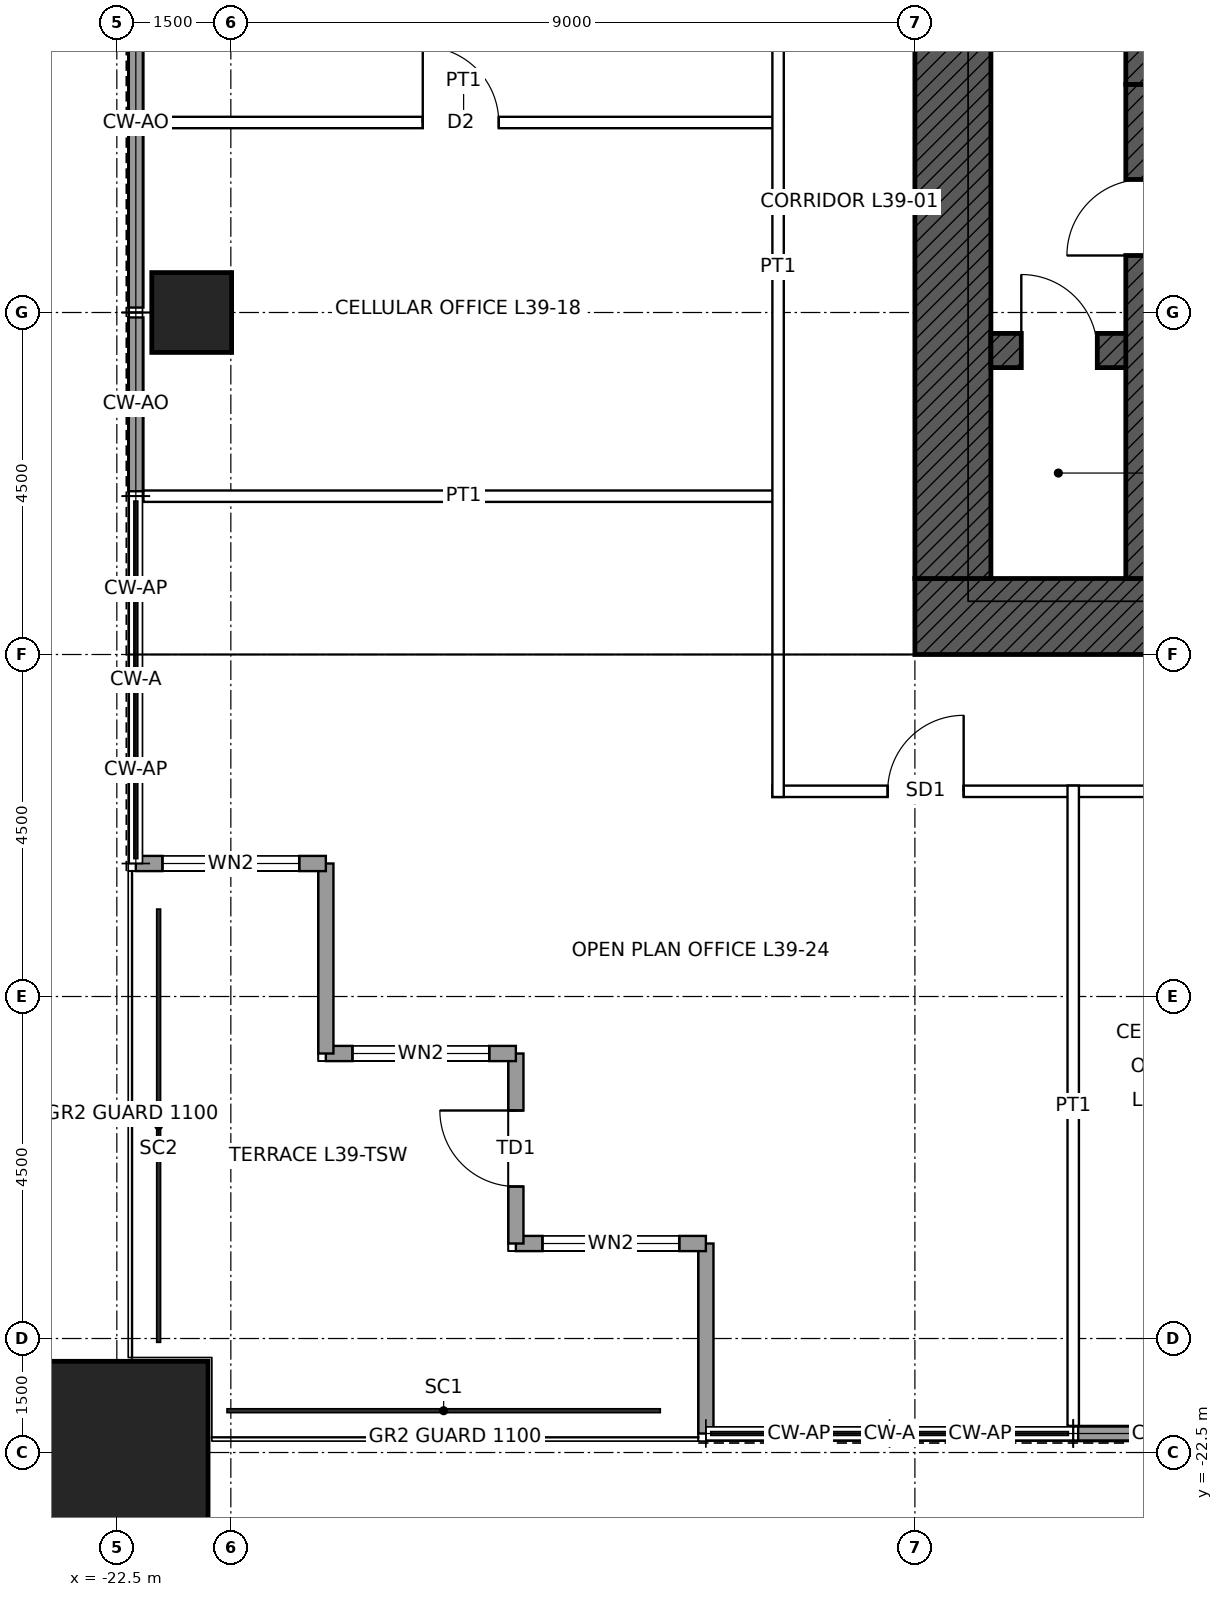
"""IFC4 building model, lengths in metres.
Left out: names, types, materials, properties, quantities, classifications, styles, units other than length and angle.
Written with IfcOpenShell. Run it as: python <this file> out.ifc"""

import sys

from ifc_helpers import new_model, si_unit, direction, frame, frame_2d, origin, origin_2d, place, context, subcontext, project, spatial, rectangle, hollow_rectangle, extrude, element, fill, save


model = new_model("IFC4")
c1 = context("Model", 3, precision=1e-05, world=origin(), true_north=direction((0.0, 1.0)))
c2 = subcontext(c1, "Body", "Model", "MODEL_VIEW")
j1 = project(units=[si_unit("LENGTHUNIT", "METRE"), si_unit("PLANEANGLEUNIT", "RADIAN")], contexts=[c1])
p1 = place(None, origin())
s1 = spatial("IfcSite", under=j1, at=p1, CompositionType="ELEMENT")
p2 = place(p1, origin())
s2 = spatial("IfcBuilding", under=s1, at=p2, CompositionType="ELEMENT")
p3 = place(p2, frame((0.0, 0.0, 189.9)))
s3 = spatial("IfcBuildingStorey", under=s2, at=p3, CompositionType="ELEMENT", Elevation=189.9)
p4 = place(p3, frame((-22.5, -22.5, 0.0), z_axis=(0.0, 0.0, 1.0), x_axis=(1.0, 0.0, 0.0)))
e1 = element("IfcColumn", 1, at=p4, inside=s3, PredefinedType="COLUMN", context=c2, shape_type="SweptSolid", body=[
    extrude(hollow_rectangle(XDim=2.4, YDim=2.4, WallThickness=0.12, at=origin_2d()), origin(), (0.0, 0.0, 1.0), 4.0),
])
p5 = place(p3, frame((-21.515, -7.5, 0.0), z_axis=(0.0, 0.0, 1.0), x_axis=(1.0, 0.0, 0.0)))
e2 = element("IfcColumn", 2, at=p5, inside=s3, PredefinedType="COLUMN", context=c2, shape_type="SweptSolid", body=[
    extrude(hollow_rectangle(XDim=1.05, YDim=1.05, WallThickness=0.07, at=origin_2d()), origin(), (0.0, 0.0, 1.0), 4.0),
])
p6 = place(p3, frame((12.0, -11.5, 0.0), z_axis=(0.0, 0.0, 1.0), x_axis=(-1.0, 0.0, 0.0)))
e3 = element("IfcWall", 3, at=p6, inside=s3, PredefinedType="SHEAR", context=c2, shape_type="SweptSolid", body=[
    extrude(rectangle(XDim=24.0, YDim=1.0, at=frame_2d((12.0, 0.0))), origin(), (0.0, 0.0, 1.0), 4.0),
])
p7 = place(p6, frame((11.5, 0.0, 0.0)))
e4 = element("IfcOpeningElement", 4, at=p7, cuts=e3, PredefinedType="OPENING", context=c2, shape_type="SweptSolid", body=[
    extrude(rectangle(XDim=1.0, YDim=2.1, at=frame_2d((0.5, 1.05))), frame((0.0, 0.51, 0.0), z_axis=(0.0, -1.0, 0.0), x_axis=(1.0, 0.0, 0.0)), (0.0, 0.0, 1.0), 1.02),
])
p8 = place(p6, frame((1.0, 0.0, 0.0)))
e5 = element("IfcOpeningElement", 5, at=p8, cuts=e3, PredefinedType="OPENING", context=c2, shape_type="SweptSolid", body=[
    extrude(rectangle(XDim=1.0, YDim=2.4, at=frame_2d((0.5, 1.2))), frame((0.0, 0.51, 0.0), z_axis=(0.0, -1.0, 0.0), x_axis=(1.0, 0.0, 0.0)), (0.0, 0.0, 1.0), 1.02),
])
p9 = place(p3, frame((-11.5, -11.0, 0.0), z_axis=(0.0, 0.0, 1.0), x_axis=(0.0, 1.0, 0.0)))
e6 = element("IfcWall", 6, at=p9, inside=s3, PredefinedType="SHEAR", context=c2, shape_type="SweptSolid", body=[
    extrude(rectangle(XDim=22.0, YDim=1.0, at=frame_2d((11.0, 0.0))), origin(), (0.0, 0.0, 1.0), 4.0),
])
p10 = place(p9, frame((10.5, 0.0, 0.0)))
e7 = element("IfcOpeningElement", 7, at=p10, cuts=e6, PredefinedType="OPENING", context=c2, shape_type="SweptSolid", body=[
    extrude(rectangle(XDim=1.0, YDim=2.4, at=frame_2d((0.5, 1.2))), frame((0.0, 0.51, 0.0), z_axis=(0.0, -1.0, 0.0), x_axis=(1.0, 0.0, 0.0)), (0.0, 0.0, 1.0), 1.02),
])
p11 = place(p3, frame((-9.0, -4.5, 0.0), z_axis=(0.0, 0.0, 1.0), x_axis=(1.0, 0.0, 0.0)))
e8 = element("IfcWall", 8, at=p11, inside=s3, PredefinedType="SHEAR", context=c2, shape_type="SweptSolid", body=[
    extrude(rectangle(XDim=18.0, YDim=0.45, at=frame_2d((9.0, 0.0))), origin(), (0.0, 0.0, 1.0), 4.0),
])
p12 = place(p3, frame((-11.0, -8.0, 0.0), z_axis=(0.0, 0.0, 1.0), x_axis=(1.0, 0.0, 0.0)))
e9 = element("IfcWall", 9, at=p12, inside=s3, PredefinedType="SHEAR", context=c2, shape_type="SweptSolid", body=[
    extrude(rectangle(XDim=2.0, YDim=0.45, at=frame_2d((1.0, 0.0))), origin(), (0.0, 0.0, 1.0), 4.0),
])
p13 = place(p12, frame((0.4, 0.0, 0.0)))
e10 = element("IfcOpeningElement", 10, at=p13, cuts=e9, PredefinedType="OPENING", context=c2, shape_type="SweptSolid", body=[
    extrude(rectangle(XDim=1.0, YDim=2.1, at=frame_2d((0.5, 1.05))), frame((0.0, 0.235, 0.0), z_axis=(0.0, -1.0, 0.0), x_axis=(1.0, 0.0, 0.0)), (0.0, 0.0, 1.0), 0.47),
])
p14 = place(p3, frame((-9.0, -4.5, 0.0), z_axis=(0.0, 0.0, 1.0), x_axis=(0.0, 1.0, 0.0)))
e11 = element("IfcWall", 11, at=p14, inside=s3, PredefinedType="SHEAR", context=c2, shape_type="SweptSolid", body=[
    extrude(rectangle(XDim=3.0, YDim=0.45, at=frame_2d((1.5, 0.0))), origin(), (0.0, 0.0, 1.0), 4.0),
])
p15 = place(p3, frame((-9.0, -11.0, 0.0), z_axis=(0.0, 0.0, 1.0), x_axis=(0.0, 1.0, 0.0)))
e12 = element("IfcWall", 12, at=p15, inside=s3, PredefinedType="SHEAR", context=c2, shape_type="SweptSolid", body=[
    extrude(rectangle(XDim=6.5, YDim=0.45, at=frame_2d((3.25, 0.0))), origin(), (0.0, 0.0, 1.0), 4.0),
])
p16 = place(p15, frame((4.25, 0.0, 0.0)))
e13 = element("IfcOpeningElement", 13, at=p16, cuts=e12, PredefinedType="OPENING", context=c2, shape_type="SweptSolid", body=[
    extrude(rectangle(XDim=1.0, YDim=2.1, at=frame_2d((0.5, 1.05))), frame((0.0, 0.235, 0.0), z_axis=(0.0, -1.0, 0.0), x_axis=(1.0, 0.0, 0.0)), (0.0, 0.0, 1.0), 0.47),
])
p17 = place(p3, frame((-14.75, -22.25, 0.0), z_axis=(0.0, 0.0, 1.0), x_axis=(0.0, 1.0, 0.0)))
e14 = element("IfcWall", 14, at=p17, inside=s3, PredefinedType="SOLIDWALL", context=c2, shape_type="SweptSolid", body=[
    extrude(rectangle(XDim=2.5, YDim=0.2, at=frame_2d((1.25, 0.0))), origin(), (0.0, 0.0, 1.0), 3.85),
])
p18 = place(p3, frame((-14.75, -19.75, 0.0), z_axis=(0.0, 0.0, 1.0), x_axis=(-1.0, 0.0, 0.0)))
e15 = element("IfcWall", 15, at=p18, inside=s3, PredefinedType="SOLIDWALL", context=c2, shape_type="SweptSolid", body=[
    extrude(rectangle(XDim=2.5, YDim=0.2, at=frame_2d((1.25, 0.0))), origin(), (0.0, 0.0, 1.0), 3.85),
])
p19 = place(p18, frame((0.35, 0.0, 0.3)))
e16 = element("IfcOpeningElement", 16, at=p19, cuts=e15, PredefinedType="OPENING", context=c2, shape_type="SweptSolid", body=[
    extrude(rectangle(XDim=1.8, YDim=2.4, at=frame_2d((0.9, 1.2))), frame((0.0, 0.11, 0.0), z_axis=(0.0, -1.0, 0.0), x_axis=(1.0, 0.0, 0.0)), (0.0, 0.0, 1.0), 0.22),
])
p20 = place(p3, frame((-17.25, -19.75, 0.0), z_axis=(0.0, 0.0, 1.0), x_axis=(0.0, 1.0, 0.0)))
e17 = element("IfcWall", 17, at=p20, inside=s3, PredefinedType="SOLIDWALL", context=c2, shape_type="SweptSolid", body=[
    extrude(rectangle(XDim=2.5, YDim=0.2, at=frame_2d((1.25, 0.0))), origin(), (0.0, 0.0, 1.0), 3.85),
])
p21 = place(p20, frame((0.75, 0.0, 0.0)))
e18 = element("IfcOpeningElement", 18, at=p21, cuts=e17, PredefinedType="OPENING", context=c2, shape_type="SweptSolid", body=[
    extrude(rectangle(XDim=1.0, YDim=2.4, at=frame_2d((0.5, 1.2))), frame((0.0, 0.11, 0.0), z_axis=(0.0, -1.0, 0.0), x_axis=(1.0, 0.0, 0.0)), (0.0, 0.0, 1.0), 0.22),
])
p22 = place(p3, frame((-17.25, -17.25, 0.0), z_axis=(0.0, 0.0, 1.0), x_axis=(-1.0, 0.0, 0.0)))
e19 = element("IfcWall", 19, at=p22, inside=s3, PredefinedType="SOLIDWALL", context=c2, shape_type="SweptSolid", body=[
    extrude(rectangle(XDim=2.5, YDim=0.2, at=frame_2d((1.25, 0.0))), origin(), (0.0, 0.0, 1.0), 3.85),
])
p23 = place(p22, frame((0.35, 0.0, 0.3)))
e20 = element("IfcOpeningElement", 20, at=p23, cuts=e19, PredefinedType="OPENING", context=c2, shape_type="SweptSolid", body=[
    extrude(rectangle(XDim=1.8, YDim=2.4, at=frame_2d((0.9, 1.2))), frame((0.0, 0.11, 0.0), z_axis=(0.0, -1.0, 0.0), x_axis=(1.0, 0.0, 0.0)), (0.0, 0.0, 1.0), 0.22),
])
p24 = place(p3, frame((-19.75, -17.25, 0.0), z_axis=(0.0, 0.0, 1.0), x_axis=(0.0, 1.0, 0.0)))
e21 = element("IfcWall", 21, at=p24, inside=s3, PredefinedType="SOLIDWALL", context=c2, shape_type="SweptSolid", body=[
    extrude(rectangle(XDim=2.5, YDim=0.2, at=frame_2d((1.25, 0.0))), origin(), (0.0, 0.0, 1.0), 3.85),
])
p25 = place(p3, frame((-19.75, -14.75, 0.0), z_axis=(0.0, 0.0, 1.0), x_axis=(-1.0, 0.0, 0.0)))
e22 = element("IfcWall", 22, at=p25, inside=s3, PredefinedType="SOLIDWALL", context=c2, shape_type="SweptSolid", body=[
    extrude(rectangle(XDim=2.5, YDim=0.2, at=frame_2d((1.25, 0.0))), origin(), (0.0, 0.0, 1.0), 3.85),
])
p26 = place(p25, frame((0.35, 0.0, 0.3)))
e23 = element("IfcOpeningElement", 23, at=p26, cuts=e22, PredefinedType="OPENING", context=c2, shape_type="SweptSolid", body=[
    extrude(rectangle(XDim=1.8, YDim=2.4, at=frame_2d((0.9, 1.2))), frame((0.0, 0.11, 0.0), z_axis=(0.0, -1.0, 0.0), x_axis=(1.0, 0.0, 0.0)), (0.0, 0.0, 1.0), 0.22),
])
for number, where, z_axis, x_axis in (
    (24, (-7.565, -22.25, 0.0), (0.0, 0.0, 1.0), (-1.0, 0.0, 0.0)),
    (25, (-22.25, -9.852, 0.0), (0.0, 0.0, 1.0), (0.0, 1.0, 0.0)),
):
    element("IfcWall", number, at=place(p3, frame(where, z_axis=z_axis, x_axis=x_axis)), inside=s3, PredefinedType="SOLIDWALL", context=c2, shape_type="SweptSolid", body=[
        extrude(rectangle(XDim=2.287, YDim=0.2, at=frame_2d((1.144, 0.0))), origin(), (0.0, 0.0, 1.0), 3.85),
    ])
for number, where, z_axis, x_axis in (
    (26, (-22.25, -7.435, 0.0), (0.0, 0.0, 1.0), (0.0, 1.0, 0.0)),
    (27, (-22.25, -4.968, 0.0), (0.0, 0.0, 1.0), (0.0, 1.0, 0.0)),
):
    element("IfcWall", number, at=place(p3, frame(where, z_axis=z_axis, x_axis=x_axis)), inside=s3, PredefinedType="SOLIDWALL", context=c2, shape_type="SweptSolid", body=[
        extrude(rectangle(XDim=2.403, YDim=0.2, at=frame_2d((1.201, 0.0))), origin(), (0.0, 0.0, 1.0), 3.85),
    ])
p27 = place(p3, frame((-13.875, -13.8, 0.0), z_axis=(0.0, 0.0, 1.0), x_axis=(1.0, 0.0, 0.0)))
e28 = element("IfcWall", 28, at=p27, inside=s3, PredefinedType="PARTITIONING", context=c2, shape_type="SweptSolid", body=[
    extrude(rectangle(XDim=27.75, YDim=0.15, at=frame_2d((13.875, 0.0))), origin(), (0.0, 0.0, 1.0), 3.85),
])
p28 = place(p27, frame((18.375, 0.0, 0.0)))
e29 = element("IfcOpeningElement", 29, at=p28, cuts=e28, PredefinedType="OPENING", context=c2, shape_type="SweptSolid", body=[
    extrude(rectangle(XDim=1.0, YDim=2.4, at=frame_2d((0.5, 1.2))), frame((0.0, 0.085, 0.0), z_axis=(0.0, -1.0, 0.0), x_axis=(1.0, 0.0, 0.0)), (0.0, 0.0, 1.0), 0.17),
])
p29 = place(p27, frame((14.975, 0.0, 0.0)))
e30 = element("IfcOpeningElement", 30, at=p29, cuts=e28, PredefinedType="OPENING", context=c2, shape_type="SweptSolid", body=[
    extrude(rectangle(XDim=1.0, YDim=2.1, at=frame_2d((0.5, 1.05))), frame((0.0, 0.085, 0.0), z_axis=(0.0, -1.0, 0.0), x_axis=(1.0, 0.0, 0.0)), (0.0, 0.0, 1.0), 0.17),
])
p30 = place(p27, frame((11.775, 0.0, 0.0)))
e31 = element("IfcOpeningElement", 31, at=p30, cuts=e28, PredefinedType="OPENING", context=c2, shape_type="SweptSolid", body=[
    extrude(rectangle(XDim=1.0, YDim=2.1, at=frame_2d((0.5, 1.05))), frame((0.0, 0.085, 0.0), z_axis=(0.0, -1.0, 0.0), x_axis=(1.0, 0.0, 0.0)), (0.0, 0.0, 1.0), 0.17),
])
p31 = place(p27, frame((8.375, 0.0, 0.0)))
e32 = element("IfcOpeningElement", 32, at=p31, cuts=e28, PredefinedType="OPENING", context=c2, shape_type="SweptSolid", body=[
    extrude(rectangle(XDim=1.0, YDim=2.4, at=frame_2d((0.5, 1.2))), frame((0.0, 0.085, 0.0), z_axis=(0.0, -1.0, 0.0), x_axis=(1.0, 0.0, 0.0)), (0.0, 0.0, 1.0), 0.17),
])
p32 = place(p27, frame((25.65, 0.0, 0.0)))
e33 = element("IfcOpeningElement", 33, at=p32, cuts=e28, PredefinedType="OPENING", context=c2, shape_type="SweptSolid", body=[
    extrude(rectangle(XDim=1.0, YDim=2.4, at=frame_2d((0.5, 1.2))), frame((0.0, 0.085, 0.0), z_axis=(0.0, -1.0, 0.0), x_axis=(1.0, 0.0, 0.0)), (0.0, 0.0, 1.0), 0.17),
])
p33 = place(p27, frame((1.517, 0.0, 0.0)))
e34 = element("IfcOpeningElement", 34, at=p33, cuts=e28, PredefinedType="OPENING", context=c2, shape_type="SweptSolid", body=[
    extrude(rectangle(XDim=1.0, YDim=2.4, at=frame_2d((0.5, 1.2))), frame((0.0, 0.085, 0.0), z_axis=(0.0, -1.0, 0.0), x_axis=(1.0, 0.0, 0.0)), (0.0, 0.0, 1.0), 0.17),
])
p34 = place(p3, frame((-22.15, -9.917, 0.0), z_axis=(0.0, 0.0, 1.0), x_axis=(1.0, 0.0, 0.0)))
e35 = element("IfcWall", 35, at=p34, inside=s3, PredefinedType="PARTITIONING", context=c2, shape_type="SweptSolid", body=[
    extrude(rectangle(XDim=8.425, YDim=0.15, at=frame_2d((4.212, 0.0))), origin(), (0.0, 0.0, 1.0), 3.85),
])
p35 = place(p3, frame((-22.15, -5.0, 0.0), z_axis=(0.0, 0.0, 1.0), x_axis=(1.0, 0.0, 0.0)))
e36 = element("IfcWall", 36, at=p35, inside=s3, PredefinedType="PARTITIONING", context=c2, shape_type="SweptSolid", body=[
    extrude(rectangle(XDim=8.425, YDim=0.15, at=frame_2d((4.212, 0.0))), origin(), (0.0, 0.0, 1.0), 3.85),
])
p36 = place(p35, frame((3.675, 0.0, 0.0)))
e37 = element("IfcOpeningElement", 37, at=p36, cuts=e36, PredefinedType="OPENING", context=c2, shape_type="SweptSolid", body=[
    extrude(rectangle(XDim=1.0, YDim=2.1, at=frame_2d((0.5, 1.05))), frame((0.0, 0.085, 0.0), z_axis=(0.0, -1.0, 0.0), x_axis=(1.0, 0.0, 0.0)), (0.0, 0.0, 1.0), 0.17),
])
p37 = place(p3, frame((-13.8, -13.875, 0.0), z_axis=(0.0, 0.0, 1.0), x_axis=(0.0, 1.0, 0.0)))
e38 = element("IfcWall", 38, at=p37, inside=s3, PredefinedType="PARTITIONING", context=c2, shape_type="SweptSolid", body=[
    extrude(rectangle(XDim=13.95, YDim=0.15, at=frame_2d((6.975, 0.0))), origin(), (0.0, 0.0, 1.0), 3.85),
])
p38 = place(p37, frame((10.875, 0.0, 0.0)))
e39 = element("IfcOpeningElement", 39, at=p38, cuts=e38, PredefinedType="OPENING", context=c2, shape_type="SweptSolid", body=[
    extrude(rectangle(XDim=1.0, YDim=2.4, at=frame_2d((0.5, 1.2))), frame((0.0, 0.085, 0.0), z_axis=(0.0, -1.0, 0.0), x_axis=(1.0, 0.0, 0.0)), (0.0, 0.0, 1.0), 0.17),
])
p39 = place(p3, frame((-9.917, -22.15, 0.0), z_axis=(0.0, 0.0, 1.0), x_axis=(0.0, 1.0, 0.0)))
e40 = element("IfcWall", 40, at=p39, inside=s3, PredefinedType="PARTITIONING", context=c2, shape_type="SweptSolid", body=[
    extrude(rectangle(XDim=8.425, YDim=0.15, at=frame_2d((4.212, 0.0))), origin(), (0.0, 0.0, 1.0), 3.85),
])
p40 = place(p19, origin())
e41 = element("IfcWindow", 41, at=p40, inside=s3, PartitioningType="SINGLE_PANEL", PredefinedType="WINDOW", context=c2, shape_type="SweptSolid", body=[
    extrude(rectangle(XDim=1.8, YDim=2.4, at=frame_2d((0.9, 1.2))), frame((0.0, 0.03, 0.0), z_axis=(0.0, -1.0, 0.0), x_axis=(1.0, 0.0, 0.0)), (0.0, 0.0, 1.0), 0.06),
])
fill(e16, e41)
p41 = place(p21, origin())
e42 = element("IfcDoor", 42, at=p41, inside=s3, OperationType="SINGLE_SWING_RIGHT", PredefinedType="DOOR", context=c2, shape_type="SweptSolid", body=[
    extrude(rectangle(XDim=1.0, YDim=2.4, at=frame_2d((0.5, 1.2))), frame((0.0, 0.025, 0.0), z_axis=(0.0, -1.0, 0.0), x_axis=(1.0, 0.0, 0.0)), (0.0, 0.0, 1.0), 0.05),
])
fill(e18, e42)
p42 = place(p23, origin())
e43 = element("IfcWindow", 43, at=p42, inside=s3, PartitioningType="SINGLE_PANEL", PredefinedType="WINDOW", context=c2, shape_type="SweptSolid", body=[
    extrude(rectangle(XDim=1.8, YDim=2.4, at=frame_2d((0.9, 1.2))), frame((0.0, 0.03, 0.0), z_axis=(0.0, -1.0, 0.0), x_axis=(1.0, 0.0, 0.0)), (0.0, 0.0, 1.0), 0.06),
])
fill(e20, e43)
p43 = place(p26, origin())
e44 = element("IfcWindow", 44, at=p43, inside=s3, PartitioningType="SINGLE_PANEL", PredefinedType="WINDOW", context=c2, shape_type="SweptSolid", body=[
    extrude(rectangle(XDim=1.8, YDim=2.4, at=frame_2d((0.9, 1.2))), frame((0.0, 0.03, 0.0), z_axis=(0.0, -1.0, 0.0), x_axis=(1.0, 0.0, 0.0)), (0.0, 0.0, 1.0), 0.06),
])
fill(e23, e44)
p44 = place(p16, origin())
e45 = element("IfcDoor", 45, at=p44, inside=s3, OperationType="SINGLE_SWING_LEFT", PredefinedType="DOOR", context=c2, shape_type="SweptSolid", body=[
    extrude(rectangle(XDim=1.0, YDim=2.1, at=frame_2d((0.5, 1.05))), frame((0.0, 0.025, 0.0), z_axis=(0.0, -1.0, 0.0), x_axis=(1.0, 0.0, 0.0)), (0.0, 0.0, 1.0), 0.05),
])
fill(e13, e45)
p45 = place(p13, origin())
e46 = element("IfcDoor", 46, at=p45, inside=s3, OperationType="SINGLE_SWING_LEFT", PredefinedType="DOOR", context=c2, shape_type="SweptSolid", body=[
    extrude(rectangle(XDim=1.0, YDim=2.1, at=frame_2d((0.5, 1.05))), frame((0.0, 0.025, 0.0), z_axis=(0.0, -1.0, 0.0), x_axis=(1.0, 0.0, 0.0)), (0.0, 0.0, 1.0), 0.05),
])
fill(e10, e46)
p46 = place(p36, origin())
e47 = element("IfcDoor", 47, at=p46, inside=s3, OperationType="SINGLE_SWING_LEFT", PredefinedType="DOOR", context=c2, shape_type="SweptSolid", body=[
    extrude(rectangle(XDim=1.0, YDim=2.1, at=frame_2d((0.5, 1.05))), frame((0.0, 0.025, 0.0), z_axis=(0.0, -1.0, 0.0), x_axis=(1.0, 0.0, 0.0)), (0.0, 0.0, 1.0), 0.05),
])
fill(e37, e47)
p47 = place(p33, origin())
e48 = element("IfcDoor", 48, at=p47, inside=s3, OperationType="SINGLE_SWING_RIGHT", PredefinedType="DOOR", context=c2, shape_type="SweptSolid", body=[
    extrude(rectangle(XDim=1.0, YDim=2.4, at=frame_2d((0.5, 1.2))), frame((0.0, 0.025, 0.0), z_axis=(0.0, -1.0, 0.0), x_axis=(1.0, 0.0, 0.0)), (0.0, 0.0, 1.0), 0.05),
])
fill(e34, e48)
save(model, sys.argv[1])
